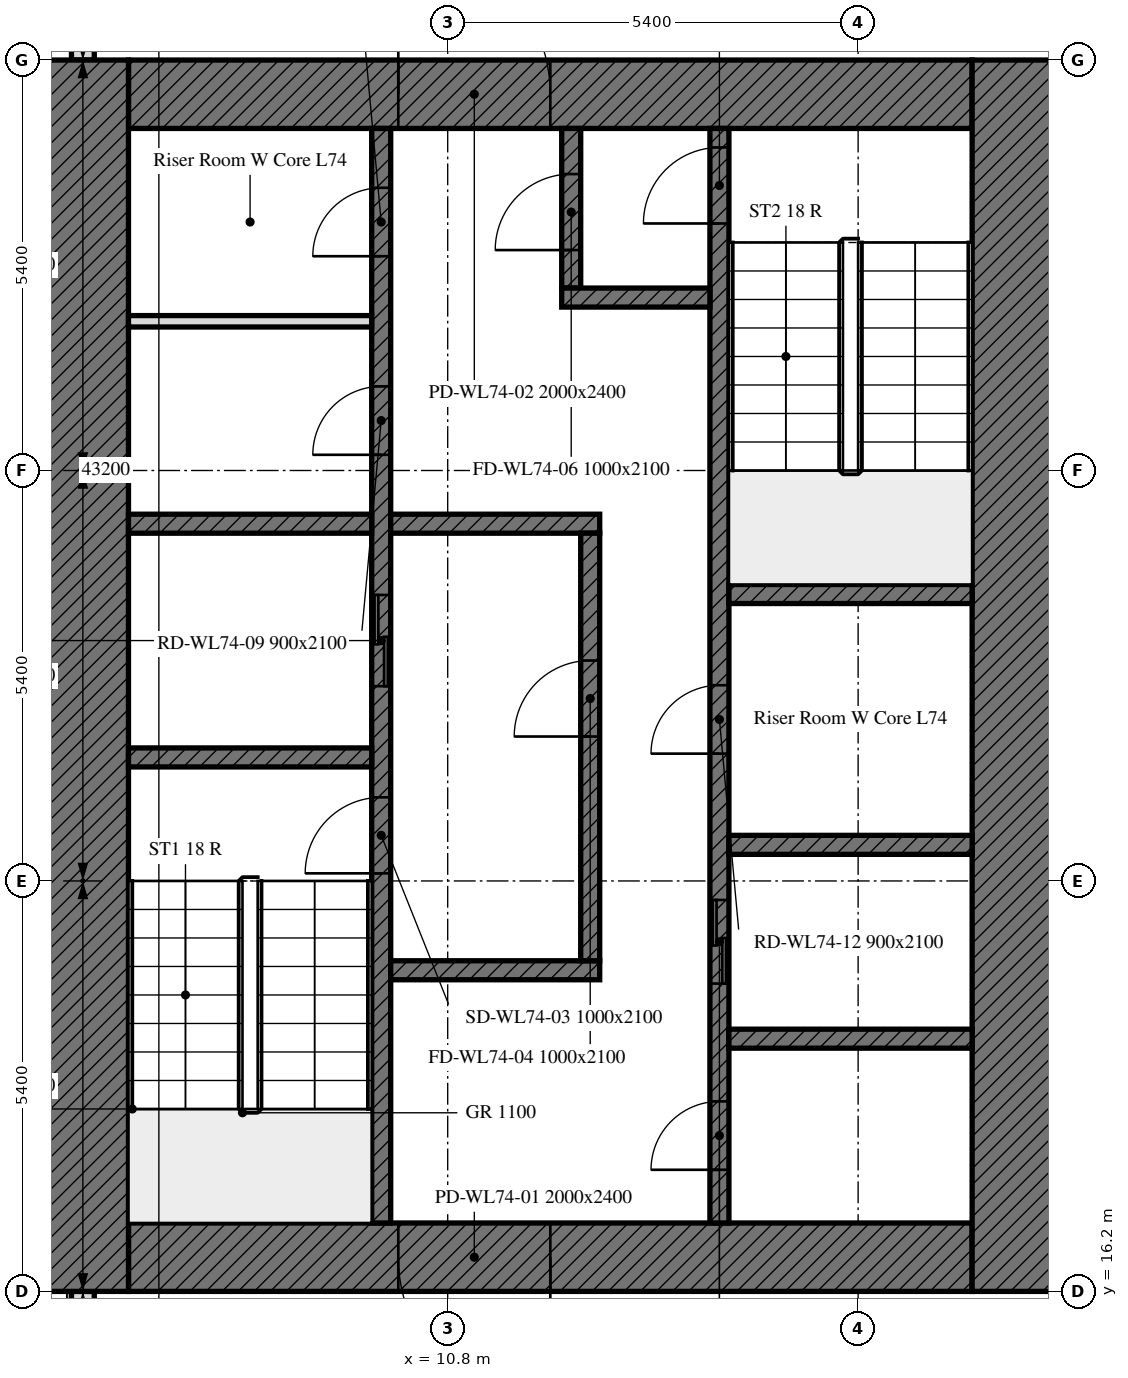
"""IFC4 building model, lengths in metres.
Left out: names, types, materials, properties, quantities, classifications, styles, units other than length and angle.
Written with IfcOpenShell. Run it as: python <this file> out.ifc"""

import sys

from ifc_helpers import new_model, si_unit, direction, frame, frame_2d, origin, place, context, subcontext, project, spatial, rectangle, extrude, element, fill, save


model = new_model("IFC4")
c1 = context("Model", 3, precision=1e-05, world=origin(), true_north=direction((0.0, 1.0)))
c2 = subcontext(c1, "Body", "Model", "MODEL_VIEW")
j1 = project(units=[si_unit("LENGTHUNIT", "METRE"), si_unit("PLANEANGLEUNIT", "RADIAN")], contexts=[c1])
p1 = place(None, origin())
s1 = spatial("IfcSite", under=j1, at=p1, CompositionType="ELEMENT")
p2 = place(p1, origin())
s2 = spatial("IfcBuilding", under=s1, at=p2, CompositionType="ELEMENT")
p3 = place(p2, frame((0.0, 0.0, 298.3)))
s3 = spatial("IfcBuildingStorey", under=s2, at=p3, CompositionType="ELEMENT", Elevation=298.3)
p4 = place(p3, frame((6.0, 43.014, 0.0), z_axis=(0.0, 0.0, 1.0), x_axis=(0.0, -1.0, 0.0)))
e1 = element("IfcWall", 1, at=p4, inside=s3, PredefinedType="SOLIDWALL", context=c2, shape_type="SweptSolid", body=[
    extrude(rectangle(XDim=10.614, YDim=0.3, at=frame_2d((5.307, 0.0))), origin(), (0.0, 0.0, 1.0), 3.0),
])
p5 = place(p4, frame((1.164, 0.0, 0.9)))
e2 = element("IfcOpeningElement", 2, at=p5, cuts=e1, PredefinedType="OPENING", context=c2, shape_type="SweptSolid", body=[
    extrude(rectangle(XDim=1.1, YDim=1.7, at=frame_2d((0.55, 0.85))), frame((0.0, 0.16, 0.0), z_axis=(0.0, -1.0, 0.0), x_axis=(1.0, 0.0, 0.0)), (0.0, 0.0, 1.0), 0.32),
])
p6 = place(p4, frame((2.764, 0.0, 0.9)))
e3 = element("IfcOpeningElement", 3, at=p6, cuts=e1, PredefinedType="OPENING", context=c2, shape_type="SweptSolid", body=[
    extrude(rectangle(XDim=1.1, YDim=1.7, at=frame_2d((0.55, 0.85))), frame((0.0, 0.16, 0.0), z_axis=(0.0, -1.0, 0.0), x_axis=(1.0, 0.0, 0.0)), (0.0, 0.0, 1.0), 0.32),
])
p7 = place(p4, frame((6.564, 0.0, 0.9)))
e4 = element("IfcOpeningElement", 4, at=p7, cuts=e1, PredefinedType="OPENING", context=c2, shape_type="SweptSolid", body=[
    extrude(rectangle(XDim=1.1, YDim=1.7, at=frame_2d((0.55, 0.85))), frame((0.0, 0.16, 0.0), z_axis=(0.0, -1.0, 0.0), x_axis=(1.0, 0.0, 0.0)), (0.0, 0.0, 1.0), 0.32),
])
p8 = place(p4, frame((7.989, 0.0, 0.9)))
e5 = element("IfcOpeningElement", 5, at=p8, cuts=e1, PredefinedType="OPENING", context=c2, shape_type="SweptSolid", body=[
    extrude(rectangle(XDim=0.65, YDim=1.7, at=frame_2d((0.325, 0.85))), frame((0.0, 0.16, 0.0), z_axis=(0.0, -1.0, 0.0), x_axis=(1.0, 0.0, 0.0)), (0.0, 0.0, 1.0), 0.32),
])
p9 = place(p3, frame((6.0, 16.2, 0.0), z_axis=(0.0, 0.0, 1.0), x_axis=(0.0, -1.0, 0.0)))
e6 = element("IfcWall", 6, at=p9, inside=s3, PredefinedType="SOLIDWALL", context=c2, shape_type="SweptSolid", body=[
    extrude(rectangle(XDim=5.214, YDim=0.3, at=frame_2d((2.607, 0.0))), origin(), (0.0, 0.0, 1.0), 3.0),
])
p10 = place(p9, frame((1.975, 0.0, 0.9)))
e7 = element("IfcOpeningElement", 7, at=p10, cuts=e6, PredefinedType="OPENING", context=c2, shape_type="SweptSolid", body=[
    extrude(rectangle(XDim=0.65, YDim=1.7, at=frame_2d((0.325, 0.85))), frame((0.0, 0.16, 0.0), z_axis=(0.0, -1.0, 0.0), x_axis=(1.0, 0.0, 0.0)), (0.0, 0.0, 1.0), 0.32),
])
p11 = place(p9, frame((2.8, 0.0, 0.9)))
e8 = element("IfcOpeningElement", 8, at=p11, cuts=e6, PredefinedType="OPENING", context=c2, shape_type="SweptSolid", body=[
    extrude(rectangle(XDim=1.1, YDim=1.7, at=frame_2d((0.55, 0.85))), frame((0.0, 0.16, 0.0), z_axis=(0.0, -1.0, 0.0), x_axis=(1.0, 0.0, 0.0)), (0.0, 0.0, 1.0), 0.32),
])
p12 = place(p3, frame((17.7, 16.65, 0.0), z_axis=(0.0, 0.0, 1.0), x_axis=(-1.0, 0.0, 0.0)))
e9 = element("IfcWall", 9, at=p12, inside=s3, PredefinedType="SOLIDWALL", context=c2, shape_type="SweptSolid", body=[
    extrude(rectangle(XDim=11.1, YDim=0.9, at=frame_2d((5.55, 0.0))), origin(), (0.0, 0.0, 1.0), 3.0),
])
p13 = place(p12, frame((5.55, 0.0, 0.0)))
e10 = element("IfcOpeningElement", 10, at=p13, cuts=e9, PredefinedType="OPENING", context=c2, shape_type="SweptSolid", body=[
    extrude(rectangle(XDim=2.0, YDim=2.4, at=frame_2d((1.0, 1.2))), frame((0.0, 0.45, 0.0), z_axis=(0.0, -1.0, 0.0), x_axis=(1.0, 0.0, 0.0)), (0.0, 0.0, 1.0), 0.9),
])
p14 = place(p3, frame((6.6, 31.95, 0.0), z_axis=(0.0, 0.0, 1.0), x_axis=(1.0, 0.0, 0.0)))
e11 = element("IfcWall", 11, at=p14, inside=s3, PredefinedType="SOLIDWALL", context=c2, shape_type="SweptSolid", body=[
    extrude(rectangle(XDim=11.1, YDim=0.9, at=frame_2d((5.55, 0.0))), origin(), (0.0, 0.0, 1.0), 3.0),
])
p15 = place(p14, frame((3.55, 0.0, 0.0)))
e12 = element("IfcOpeningElement", 12, at=p15, cuts=e11, PredefinedType="OPENING", context=c2, shape_type="SweptSolid", body=[
    extrude(rectangle(XDim=2.0, YDim=2.4, at=frame_2d((1.0, 1.2))), frame((0.0, 0.45, 0.0), z_axis=(0.0, -1.0, 0.0), x_axis=(1.0, 0.0, 0.0)), (0.0, 0.0, 1.0), 0.9),
])
for number, where, z_axis, x_axis in (
    (13, (6.0, 16.2, 0.0), (0.0, 0.0, 1.0), (0.0, 1.0, 0.0)),
    (14, (18.3, 32.4, 0.0), (0.0, 0.0, 1.0), (0.0, -1.0, 0.0)),
):
    element("IfcWall", number, at=place(p3, frame(where, z_axis=z_axis, x_axis=x_axis)), inside=s3, PredefinedType="SOLIDWALL", context=c2, shape_type="SweptSolid", body=[
        extrude(rectangle(XDim=16.2, YDim=1.2, at=frame_2d((8.1, 0.0))), origin(), (0.0, 0.0, 1.0), 3.0),
    ])
p16 = place(p3, frame((9.925, 17.1, 0.0), z_axis=(0.0, 0.0, 1.0), x_axis=(0.0, 1.0, 0.0)))
e15 = element("IfcWall", 15, at=p16, inside=s3, PredefinedType="SOLIDWALL", context=c2, shape_type="SweptSolid", body=[
    extrude(rectangle(XDim=14.4, YDim=0.25, at=frame_2d((7.2, 0.0))), origin(), (0.0, 0.0, 1.0), 3.0),
])
p17 = place(p16, frame((4.6, 0.0, 0.0)))
e16 = element("IfcOpeningElement", 16, at=p17, cuts=e15, PredefinedType="OPENING", context=c2, shape_type="SweptSolid", body=[
    extrude(rectangle(XDim=1.0, YDim=2.1, at=frame_2d((0.5, 1.05))), frame((0.0, 0.125, 0.0), z_axis=(0.0, -1.0, 0.0), x_axis=(1.0, 0.0, 0.0)), (0.0, 0.0, 1.0), 0.25),
])
p18 = place(p16, frame((7.062, 0.0, 0.0)))
e17 = element("IfcOpeningElement", 17, at=p18, cuts=e15, PredefinedType="OPENING", context=c2, shape_type="SweptSolid", body=[
    extrude(rectangle(XDim=1.2, YDim=2.1, at=frame_2d((0.6, 1.05))), frame((0.0, 0.125, 0.0), z_axis=(0.0, -1.0, 0.0), x_axis=(1.0, 0.0, 0.0)), (0.0, 0.0, 1.0), 0.25),
])
p19 = place(p16, frame((10.106, 0.0, 0.0)))
e18 = element("IfcOpeningElement", 18, at=p19, cuts=e15, PredefinedType="OPENING", context=c2, shape_type="SweptSolid", body=[
    extrude(rectangle(XDim=0.9, YDim=2.1, at=frame_2d((0.45, 1.05))), frame((0.0, 0.125, 0.0), z_axis=(0.0, -1.0, 0.0), x_axis=(1.0, 0.0, 0.0)), (0.0, 0.0, 1.0), 0.25),
])
p20 = place(p16, frame((12.719, 0.0, 0.0)))
e19 = element("IfcOpeningElement", 19, at=p20, cuts=e15, PredefinedType="OPENING", context=c2, shape_type="SweptSolid", body=[
    extrude(rectangle(XDim=0.9, YDim=2.1, at=frame_2d((0.45, 1.05))), frame((0.0, 0.125, 0.0), z_axis=(0.0, -1.0, 0.0), x_axis=(1.0, 0.0, 0.0)), (0.0, 0.0, 1.0), 0.25),
])
p21 = place(p3, frame((14.375, 17.1, 0.0), z_axis=(0.0, 0.0, 1.0), x_axis=(0.0, 1.0, 0.0)))
e20 = element("IfcWall", 20, at=p21, inside=s3, PredefinedType="SOLIDWALL", context=c2, shape_type="SweptSolid", body=[
    extrude(rectangle(XDim=14.4, YDim=0.25, at=frame_2d((7.2, 0.0))), origin(), (0.0, 0.0, 1.0), 3.0),
])
p22 = place(p21, frame((13.15, 0.0, 0.0)))
e21 = element("IfcOpeningElement", 21, at=p22, cuts=e20, PredefinedType="OPENING", context=c2, shape_type="SweptSolid", body=[
    extrude(rectangle(XDim=1.0, YDim=2.1, at=frame_2d((0.5, 1.05))), frame((0.0, 0.125, 0.0), z_axis=(0.0, -1.0, 0.0), x_axis=(1.0, 0.0, 0.0)), (0.0, 0.0, 1.0), 0.25),
])
p23 = place(p21, frame((3.15, 0.0, 0.0)))
e22 = element("IfcOpeningElement", 22, at=p23, cuts=e20, PredefinedType="OPENING", context=c2, shape_type="SweptSolid", body=[
    extrude(rectangle(XDim=1.1, YDim=2.1, at=frame_2d((0.55, 1.05))), frame((0.0, 0.125, 0.0), z_axis=(0.0, -1.0, 0.0), x_axis=(1.0, 0.0, 0.0)), (0.0, 0.0, 1.0), 0.25),
])
p24 = place(p21, frame((0.7, 0.0, 0.0)))
e23 = element("IfcOpeningElement", 23, at=p24, cuts=e20, PredefinedType="OPENING", context=c2, shape_type="SweptSolid", body=[
    extrude(rectangle(XDim=0.9, YDim=2.1, at=frame_2d((0.45, 1.05))), frame((0.0, 0.125, 0.0), z_axis=(0.0, -1.0, 0.0), x_axis=(1.0, 0.0, 0.0)), (0.0, 0.0, 1.0), 0.25),
])
p25 = place(p21, frame((6.175, 0.0, 0.0)))
e24 = element("IfcOpeningElement", 24, at=p25, cuts=e20, PredefinedType="OPENING", context=c2, shape_type="SweptSolid", body=[
    extrude(rectangle(XDim=0.9, YDim=2.1, at=frame_2d((0.45, 1.05))), frame((0.0, 0.125, 0.0), z_axis=(0.0, -1.0, 0.0), x_axis=(1.0, 0.0, 0.0)), (0.0, 0.0, 1.0), 0.25),
])
for number, where, z_axis, x_axis in (
    (25, (6.6, 23.225, 0.0), (0.0, 0.0, 1.0), (1.0, 0.0, 0.0)),
    (26, (14.5, 25.375, 0.0), (0.0, 0.0, 1.0), (1.0, 0.0, 0.0)),
    (27, (14.5, 22.075, 0.0), (0.0, 0.0, 1.0), (1.0, 0.0, 0.0)),
    (28, (6.6, 26.3, 0.0), (0.0, 0.0, 1.0), (1.0, 0.0, 0.0)),
):
    element("IfcWall", number, at=place(p3, frame(where, z_axis=z_axis, x_axis=x_axis)), inside=s3, PredefinedType="SOLIDWALL", context=c2, shape_type="SweptSolid", body=[
        extrude(rectangle(XDim=3.2, YDim=0.25, at=frame_2d((1.6, 0.0))), origin(), (0.0, 0.0, 1.0), 3.0),
    ])
for number, where, z_axis, x_axis in (
    (29, (10.05, 26.3, 0.0), (0.0, 0.0, 1.0), (1.0, 0.0, 0.0)),
    (30, (10.05, 20.425, 0.0), (0.0, 0.0, 1.0), (1.0, 0.0, 0.0)),
):
    element("IfcWall", number, at=place(p3, frame(where, z_axis=z_axis, x_axis=x_axis)), inside=s3, PredefinedType="SOLIDWALL", context=c2, shape_type="SweptSolid", body=[
        extrude(rectangle(XDim=2.75, YDim=0.25, at=frame_2d((1.375, 0.0))), origin(), (0.0, 0.0, 1.0), 3.0),
    ])
p26 = place(p3, frame((12.425, 29.4, 0.0), z_axis=(0.0, 0.0, 1.0), x_axis=(0.0, 1.0, 0.0)))
e31 = element("IfcWall", 31, at=p26, inside=s3, PredefinedType="SOLIDWALL", context=c2, shape_type="SweptSolid", body=[
    extrude(rectangle(XDim=2.1, YDim=0.25, at=frame_2d((1.05, 0.0))), origin(), (0.0, 0.0, 1.0), 3.0),
])
p27 = place(p26, frame((0.5, 0.0, 0.0)))
e32 = element("IfcOpeningElement", 32, at=p27, cuts=e31, PredefinedType="OPENING", context=c2, shape_type="SweptSolid", body=[
    extrude(rectangle(XDim=1.0, YDim=2.1, at=frame_2d((0.5, 1.05))), frame((0.0, 0.125, 0.0), z_axis=(0.0, -1.0, 0.0), x_axis=(1.0, 0.0, 0.0)), (0.0, 0.0, 1.0), 0.25),
])
p28 = place(p3, frame((12.3, 29.275, 0.0), z_axis=(0.0, 0.0, 1.0), x_axis=(1.0, 0.0, 0.0)))
e33 = element("IfcWall", 33, at=p28, inside=s3, PredefinedType="SOLIDWALL", context=c2, shape_type="SweptSolid", body=[
    extrude(rectangle(XDim=1.95, YDim=0.25, at=frame_2d((0.975, 0.0))), origin(), (0.0, 0.0, 1.0), 3.0),
])
p29 = place(p3, frame((12.675, 20.55, 0.0), z_axis=(0.0, 0.0, 1.0), x_axis=(0.0, 1.0, 0.0)))
e34 = element("IfcWall", 34, at=p29, inside=s3, PredefinedType="SOLIDWALL", context=c2, shape_type="SweptSolid", body=[
    extrude(rectangle(XDim=5.625, YDim=0.25, at=frame_2d((2.812, 0.0))), origin(), (0.0, 0.0, 1.0), 3.0),
])
p30 = place(p29, frame((2.95, 0.0, 0.0)))
e35 = element("IfcOpeningElement", 35, at=p30, cuts=e34, PredefinedType="OPENING", context=c2, shape_type="SweptSolid", body=[
    extrude(rectangle(XDim=1.0, YDim=2.1, at=frame_2d((0.5, 1.05))), frame((0.0, 0.125, 0.0), z_axis=(0.0, -1.0, 0.0), x_axis=(1.0, 0.0, 0.0)), (0.0, 0.0, 1.0), 0.25),
])
p31 = place(p3, frame((14.5, 19.525, 0.0), z_axis=(0.0, 0.0, 1.0), x_axis=(1.0, 0.0, 0.0)))
e36 = element("IfcWall", 36, at=p31, inside=s3, PredefinedType="SOLIDWALL", context=c2, shape_type="SweptSolid", body=[
    extrude(rectangle(XDim=3.2, YDim=0.25, at=frame_2d((1.6, 0.0))), origin(), (0.0, 0.0, 1.0), 3.0),
])
p32 = place(p3, frame((6.6, 28.963, 0.0), z_axis=(0.0, 0.0, 1.0), x_axis=(1.0, 0.0, 0.0)))
e37 = element("IfcWall", 37, at=p32, inside=s3, PredefinedType="PARTITIONING", context=c2, shape_type="SweptSolid", body=[
    extrude(rectangle(XDim=3.2, YDim=0.15, at=frame_2d((1.6, 0.0))), origin(), (0.0, 0.0, 1.0), 3.0),
])
p33 = place(p13, origin())
e38 = element("IfcDoor", 38, at=p33, inside=s3, OperationType="DOUBLE_DOOR_SINGLE_SWING", PredefinedType="DOOR", context=c2, shape_type="SweptSolid", body=[
    extrude(rectangle(XDim=2.0, YDim=2.4, at=frame_2d((1.0, 1.2))), frame((0.0, 0.025, 0.0), z_axis=(0.0, -1.0, 0.0), x_axis=(1.0, 0.0, 0.0)), (0.0, 0.0, 1.0), 0.05),
])
fill(e10, e38)
p34 = place(p15, origin())
e39 = element("IfcDoor", 39, at=p34, inside=s3, OperationType="DOUBLE_DOOR_SINGLE_SWING", PredefinedType="DOOR", context=c2, shape_type="SweptSolid", body=[
    extrude(rectangle(XDim=2.0, YDim=2.4, at=frame_2d((1.0, 1.2))), frame((0.0, 0.025, 0.0), z_axis=(0.0, -1.0, 0.0), x_axis=(1.0, 0.0, 0.0)), (0.0, 0.0, 1.0), 0.05),
])
fill(e12, e39)
p35 = place(p17, origin())
e40 = element("IfcDoor", 40, at=p35, inside=s3, OperationType="SINGLE_SWING_LEFT", PredefinedType="DOOR", context=c2, shape_type="SweptSolid", body=[
    extrude(rectangle(XDim=1.0, YDim=2.1, at=frame_2d((0.5, 1.05))), frame((0.0, 0.025, 0.0), z_axis=(0.0, -1.0, 0.0), x_axis=(1.0, 0.0, 0.0)), (0.0, 0.0, 1.0), 0.05),
])
fill(e16, e40)
p36 = place(p30, origin())
e41 = element("IfcDoor", 41, at=p36, inside=s3, OperationType="SINGLE_SWING_LEFT", PredefinedType="DOOR", context=c2, shape_type="SweptSolid", body=[
    extrude(rectangle(XDim=1.0, YDim=2.1, at=frame_2d((0.5, 1.05))), frame((0.0, 0.025, 0.0), z_axis=(0.0, -1.0, 0.0), x_axis=(1.0, 0.0, 0.0)), (0.0, 0.0, 1.0), 0.05),
])
fill(e35, e41)
p37 = place(p22, origin())
e42 = element("IfcDoor", 42, at=p37, inside=s3, OperationType="SINGLE_SWING_LEFT", PredefinedType="DOOR", context=c2, shape_type="SweptSolid", body=[
    extrude(rectangle(XDim=1.0, YDim=2.1, at=frame_2d((0.5, 1.05))), frame((0.0, 0.025, 0.0), z_axis=(0.0, -1.0, 0.0), x_axis=(1.0, 0.0, 0.0)), (0.0, 0.0, 1.0), 0.05),
])
fill(e21, e42)
p38 = place(p27, origin())
e43 = element("IfcDoor", 43, at=p38, inside=s3, OperationType="SINGLE_SWING_LEFT", PredefinedType="DOOR", context=c2, shape_type="SweptSolid", body=[
    extrude(rectangle(XDim=1.0, YDim=2.1, at=frame_2d((0.5, 1.05))), frame((0.0, 0.025, 0.0), z_axis=(0.0, -1.0, 0.0), x_axis=(1.0, 0.0, 0.0)), (0.0, 0.0, 1.0), 0.05),
])
fill(e32, e43)
p39 = place(p18, origin())
e44 = element("IfcDoor", 44, at=p39, inside=s3, OperationType="DOUBLE_DOOR_SLIDING", PredefinedType="DOOR", context=c2, shape_type="SweptSolid", body=[
    extrude(rectangle(XDim=1.2, YDim=2.1, at=frame_2d((0.6, 1.05))), frame((0.0, 0.025, 0.0), z_axis=(0.0, -1.0, 0.0), x_axis=(1.0, 0.0, 0.0)), (0.0, 0.0, 1.0), 0.05),
])
fill(e17, e44)
p40 = place(p23, origin())
e45 = element("IfcDoor", 45, at=p40, inside=s3, OperationType="DOUBLE_DOOR_SLIDING", PredefinedType="DOOR", context=c2, shape_type="SweptSolid", body=[
    extrude(rectangle(XDim=1.1, YDim=2.1, at=frame_2d((0.55, 1.05))), frame((0.0, 0.025, 0.0), z_axis=(0.0, -1.0, 0.0), x_axis=(1.0, 0.0, 0.0)), (0.0, 0.0, 1.0), 0.05),
])
fill(e22, e45)
p41 = place(p19, origin())
e46 = element("IfcDoor", 46, at=p41, inside=s3, OperationType="SINGLE_SWING_LEFT", PredefinedType="DOOR", context=c2, shape_type="SweptSolid", body=[
    extrude(rectangle(XDim=0.9, YDim=2.1, at=frame_2d((0.45, 1.05))), frame((0.0, 0.025, 0.0), z_axis=(0.0, -1.0, 0.0), x_axis=(1.0, 0.0, 0.0)), (0.0, 0.0, 1.0), 0.05),
])
fill(e18, e46)
p42 = place(p20, origin())
e47 = element("IfcDoor", 47, at=p42, inside=s3, OperationType="SINGLE_SWING_LEFT", PredefinedType="DOOR", context=c2, shape_type="SweptSolid", body=[
    extrude(rectangle(XDim=0.9, YDim=2.1, at=frame_2d((0.45, 1.05))), frame((0.0, 0.025, 0.0), z_axis=(0.0, -1.0, 0.0), x_axis=(1.0, 0.0, 0.0)), (0.0, 0.0, 1.0), 0.05),
])
fill(e19, e47)
p43 = place(p24, origin())
e48 = element("IfcDoor", 48, at=p43, inside=s3, OperationType="SINGLE_SWING_LEFT", PredefinedType="DOOR", context=c2, shape_type="SweptSolid", body=[
    extrude(rectangle(XDim=0.9, YDim=2.1, at=frame_2d((0.45, 1.05))), frame((0.0, 0.025, 0.0), z_axis=(0.0, -1.0, 0.0), x_axis=(1.0, 0.0, 0.0)), (0.0, 0.0, 1.0), 0.05),
])
fill(e23, e48)
p44 = place(p25, origin())
e49 = element("IfcDoor", 49, at=p44, inside=s3, OperationType="SINGLE_SWING_LEFT", PredefinedType="DOOR", context=c2, shape_type="SweptSolid", body=[
    extrude(rectangle(XDim=0.9, YDim=2.1, at=frame_2d((0.45, 1.05))), frame((0.0, 0.025, 0.0), z_axis=(0.0, -1.0, 0.0), x_axis=(1.0, 0.0, 0.0)), (0.0, 0.0, 1.0), 0.05),
])
fill(e24, e49)
save(model, sys.argv[1])
